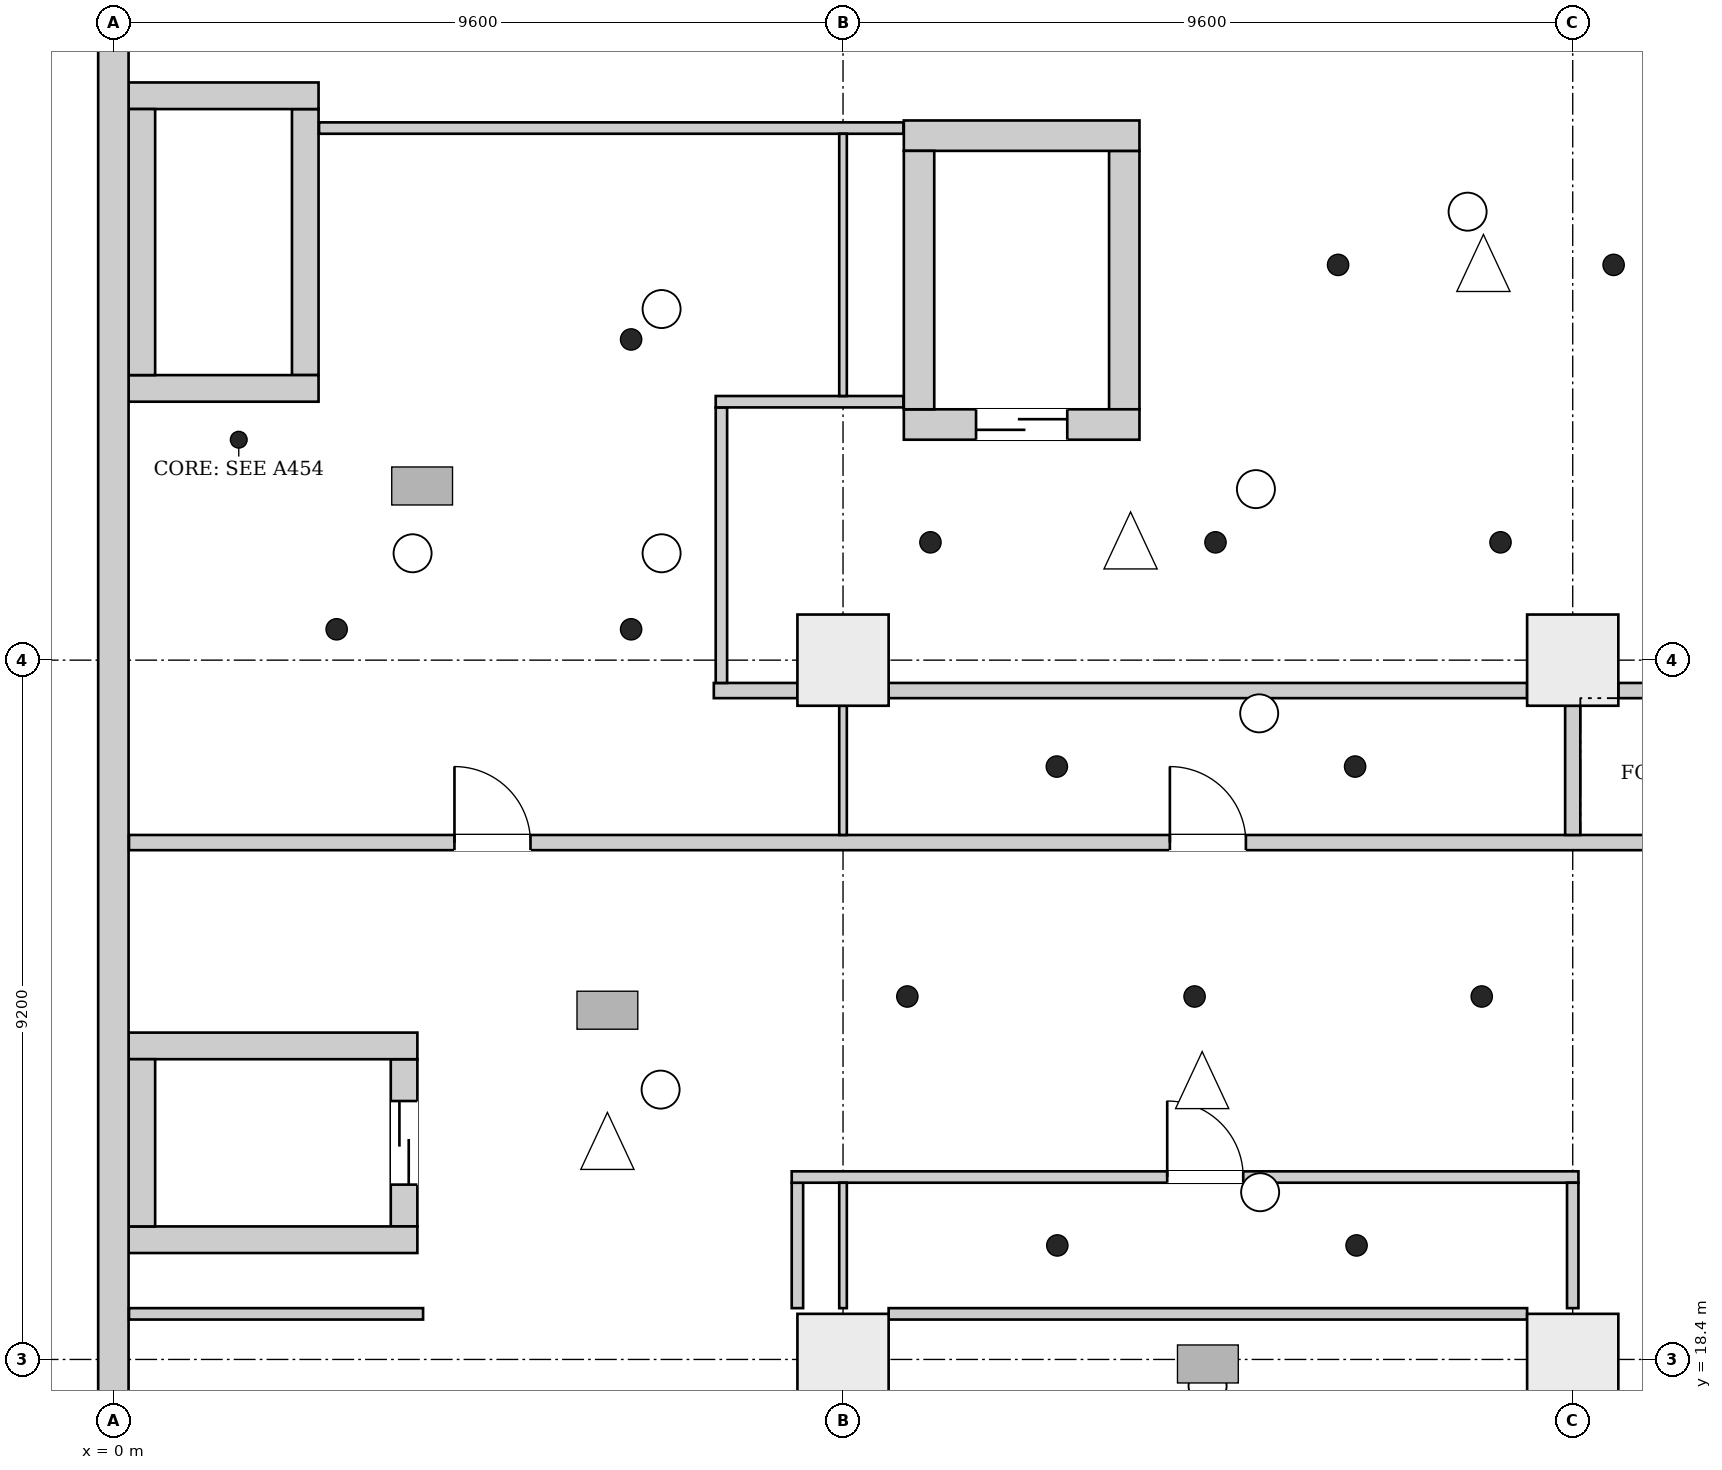
"""IFC4 building model, lengths in metres.
Left out: names, types, materials, properties, quantities, classifications, styles, units other than length and angle.
Written with IfcOpenShell. Run it as: python <this file> out.ifc"""

import sys

from ifc_helpers import new_model, si_unit, direction, frame, frame_2d, origin, origin_2d, place, context, subcontext, project, spatial, rectangle, extrude, element, fill, save


model = new_model("IFC4")
c1 = context("Model", 3, precision=1e-05, world=origin(), true_north=direction((0.0, 1.0)))
c2 = subcontext(c1, "Body", "Model", "MODEL_VIEW")
j1 = project(units=[si_unit("LENGTHUNIT", "METRE"), si_unit("PLANEANGLEUNIT", "RADIAN")], contexts=[c1])
p1 = place(None, origin())
s1 = spatial("IfcSite", under=j1, at=p1, CompositionType="ELEMENT")
p2 = place(p1, origin())
s2 = spatial("IfcBuilding", under=s1, at=p2, CompositionType="ELEMENT")
p3 = place(p2, frame((0.0, 0.0, 14.2)))
s3 = spatial("IfcBuildingStorey", under=s2, at=p3, CompositionType="ELEMENT", Elevation=14.2)
p4 = place(p3, frame((0.0, -0.2, 0.0), z_axis=(0.0, 0.0, 1.0), x_axis=(0.0, 1.0, 0.0)))
e1 = element("IfcWall", 1, at=p4, inside=s3, PredefinedType="SHEAR", context=c2, shape_type="SweptSolid", body=[
    extrude(rectangle(XDim=46.88, YDim=0.4, at=frame_2d((23.44, 0.0))), origin(), (0.0, 0.0, 1.0), 7.5),
])
for number, where, z_axis, x_axis in (
    (2, (0.2, 19.975, 0.0), (0.0, 0.0, 1.0), (1.0, 0.0, 0.0)),
    (3, (0.2, 22.525, 0.0), (0.0, 0.0, 1.0), (1.0, 0.0, 0.0)),
):
    element("IfcWall", number, at=place(p3, frame(where, z_axis=z_axis, x_axis=x_axis)), inside=s3, PredefinedType="SHEAR", context=c2, shape_type="SweptSolid", body=[
        extrude(rectangle(XDim=3.8, YDim=0.35, at=frame_2d((1.9, 0.0))), origin(), (0.0, 0.0, 1.0), 7.5),
    ])
p5 = place(p3, frame((0.375, 20.15, 0.0), z_axis=(0.0, 0.0, 1.0), x_axis=(0.0, 1.0, 0.0)))
e4 = element("IfcWall", 4, at=p5, inside=s3, PredefinedType="SHEAR", context=c2, shape_type="SweptSolid", body=[
    extrude(rectangle(XDim=2.2, YDim=0.35, at=frame_2d((1.1, 0.0))), origin(), (0.0, 0.0, 1.0), 7.5),
])
p6 = place(p3, frame((3.825, 20.15, 0.0), z_axis=(0.0, 0.0, 1.0), x_axis=(0.0, 1.0, 0.0)))
e5 = element("IfcWall", 5, at=p6, inside=s3, PredefinedType="SHEAR", context=c2, shape_type="SweptSolid", body=[
    extrude(rectangle(XDim=2.2, YDim=0.35, at=frame_2d((1.1, 0.0))), origin(), (0.0, 0.0, 1.0), 7.5),
])
p7 = place(p6, frame((0.55, 0.0, 0.0)))
e6 = element("IfcOpeningElement", 6, at=p7, cuts=e5, PredefinedType="OPENING", context=c2, shape_type="SweptSolid", body=[
    extrude(rectangle(XDim=1.1, YDim=2.1, at=frame_2d((0.55, 1.05))), frame((0.0, 0.185, 0.0), z_axis=(0.0, -1.0, 0.0), x_axis=(1.0, 0.0, 0.0)), (0.0, 0.0, 1.0), 0.37),
])
for number, where, z_axis, x_axis in (
    (7, (0.2, 31.175, 0.0), (0.0, 0.0, 1.0), (1.0, 0.0, 0.0)),
    (8, (0.2, 35.025, 0.0), (0.0, 0.0, 1.0), (1.0, 0.0, 0.0)),
):
    element("IfcWall", number, at=place(p3, frame(where, z_axis=z_axis, x_axis=x_axis)), inside=s3, PredefinedType="SHEAR", context=c2, shape_type="SweptSolid", body=[
        extrude(rectangle(XDim=2.5, YDim=0.35, at=frame_2d((1.25, 0.0))), origin(), (0.0, 0.0, 1.0), 7.5),
    ])
for number, where, z_axis, x_axis in (
    (9, (0.375, 31.35, 0.0), (0.0, 0.0, 1.0), (0.0, 1.0, 0.0)),
    (10, (2.525, 31.35, 0.0), (0.0, 0.0, 1.0), (0.0, 1.0, 0.0)),
):
    element("IfcWall", number, at=place(p3, frame(where, z_axis=z_axis, x_axis=x_axis)), inside=s3, PredefinedType="SHEAR", context=c2, shape_type="SweptSolid", body=[
        extrude(rectangle(XDim=3.5, YDim=0.35, at=frame_2d((1.75, 0.0))), origin(), (0.0, 0.0, 1.0), 7.5),
    ])
p8 = place(p3, frame((10.4, 30.7, 0.0), z_axis=(0.0, 0.0, 1.0), x_axis=(1.0, 0.0, 0.0)))
e11 = element("IfcWall", 11, at=p8, inside=s3, PredefinedType="SHEAR", context=c2, shape_type="SweptSolid", body=[
    extrude(rectangle(XDim=3.1, YDim=0.4, at=frame_2d((1.55, 0.0))), origin(), (0.0, 0.0, 1.0), 7.5),
])
p9 = place(p8, frame((0.95, 0.0, 0.0)))
e12 = element("IfcOpeningElement", 12, at=p9, cuts=e11, PredefinedType="OPENING", context=c2, shape_type="SweptSolid", body=[
    extrude(rectangle(XDim=1.2, YDim=2.1, at=frame_2d((0.6, 1.05))), frame((0.0, 0.21, 0.0), z_axis=(0.0, -1.0, 0.0), x_axis=(1.0, 0.0, 0.0)), (0.0, 0.0, 1.0), 0.42),
])
p10 = place(p3, frame((10.4, 34.5, 0.0), z_axis=(0.0, 0.0, 1.0), x_axis=(1.0, 0.0, 0.0)))
e13 = element("IfcWall", 13, at=p10, inside=s3, PredefinedType="SHEAR", context=c2, shape_type="SweptSolid", body=[
    extrude(rectangle(XDim=3.1, YDim=0.4, at=frame_2d((1.55, 0.0))), origin(), (0.0, 0.0, 1.0), 7.5),
])
for number, where, z_axis, x_axis in (
    (14, (10.6, 30.9, 0.0), (0.0, 0.0, 1.0), (0.0, 1.0, 0.0)),
    (15, (13.3, 30.9, 0.0), (0.0, 0.0, 1.0), (0.0, 1.0, 0.0)),
):
    element("IfcWall", number, at=place(p3, frame(where, z_axis=z_axis, x_axis=x_axis)), inside=s3, PredefinedType="SHEAR", context=c2, shape_type="SweptSolid", body=[
        extrude(rectangle(XDim=3.4, YDim=0.4, at=frame_2d((1.7, 0.0))), origin(), (0.0, 0.0, 1.0), 7.5),
    ])
for number, where, z_axis, x_axis in (
    (16, (9.6, 18.4, 0.0), (0.0, 0.0, 1.0), (1.0, 0.0, 0.0)),
    (17, (19.2, 18.4, 0.0), (0.0, 0.0, 1.0), (1.0, 0.0, 0.0)),
    (18, (9.6, 27.6, 0.0), (0.0, 0.0, 1.0), (1.0, 0.0, 0.0)),
    (19, (19.2, 27.6, 0.0), (0.0, 0.0, 1.0), (1.0, 0.0, 0.0)),
):
    element("IfcColumn", number, at=place(p3, frame(where, z_axis=z_axis, x_axis=x_axis)), inside=s3, PredefinedType="COLUMN", context=c2, shape_type="SweptSolid", body=[
        extrude(rectangle(XDim=1.2, YDim=1.2, at=origin_2d()), origin(), (0.0, 0.0, 1.0), 7.5),
    ])
p11 = place(p3, frame((0.206, 19.0, 0.0), z_axis=(0.0, 0.0, 1.0), x_axis=(1.0, 0.0, 0.0)))
e20 = element("IfcWall", 20, at=p11, inside=s3, PredefinedType="PARTITIONING", context=c2, shape_type="SweptSolid", body=[
    extrude(rectangle(XDim=3.869, YDim=0.15, at=frame_2d((1.935, 0.0))), origin(), (0.0, 0.0, 1.0), 7.15),
])
p12 = place(p3, frame((0.206, 25.2, 0.0), z_axis=(0.0, 0.0, 1.0), x_axis=(1.0, 0.0, 0.0)))
e21 = element("IfcWall", 21, at=p12, inside=s3, PredefinedType="PARTITIONING", context=c2, shape_type="SweptSolid", body=[
    extrude(rectangle(XDim=54.488, YDim=0.2, at=frame_2d((27.244, 0.0))), origin(), (0.0, 0.0, 1.0), 7.15),
])
p13 = place(p12, frame((4.282, 0.0, 0.0)))
e22 = element("IfcOpeningElement", 22, at=p13, cuts=e21, PredefinedType="OPENING", context=c2, shape_type="SweptSolid", body=[
    extrude(rectangle(XDim=1.0, YDim=2.1, at=frame_2d((0.5, 1.05))), frame((0.0, 0.11, 0.0), z_axis=(0.0, -1.0, 0.0), x_axis=(1.0, 0.0, 0.0)), (0.0, 0.0, 1.0), 0.22),
])
p14 = place(p12, frame((13.694, 0.0, 0.0)))
e23 = element("IfcOpeningElement", 23, at=p14, cuts=e21, PredefinedType="OPENING", context=c2, shape_type="SweptSolid", body=[
    extrude(rectangle(XDim=1.0, YDim=2.1, at=frame_2d((0.5, 1.05))), frame((0.0, 0.11, 0.0), z_axis=(0.0, -1.0, 0.0), x_axis=(1.0, 0.0, 0.0)), (0.0, 0.0, 1.0), 0.22),
])
p15 = place(p12, frame((23.294, 0.0, 0.0)))
e24 = element("IfcOpeningElement", 24, at=p15, cuts=e21, PredefinedType="OPENING", context=c2, shape_type="SweptSolid", body=[
    extrude(rectangle(XDim=1.0, YDim=2.1, at=frame_2d((0.5, 1.05))), frame((0.0, 0.11, 0.0), z_axis=(0.0, -1.0, 0.0), x_axis=(1.0, 0.0, 0.0)), (0.0, 0.0, 1.0), 0.22),
])
p16 = place(p12, frame((32.894, 0.0, 0.0)))
e25 = element("IfcOpeningElement", 25, at=p16, cuts=e21, PredefinedType="OPENING", context=c2, shape_type="SweptSolid", body=[
    extrude(rectangle(XDim=1.0, YDim=2.1, at=frame_2d((0.5, 1.05))), frame((0.0, 0.11, 0.0), z_axis=(0.0, -1.0, 0.0), x_axis=(1.0, 0.0, 0.0)), (0.0, 0.0, 1.0), 0.22),
])
p17 = place(p12, frame((42.494, 0.0, 0.0)))
e26 = element("IfcOpeningElement", 26, at=p17, cuts=e21, PredefinedType="OPENING", context=c2, shape_type="SweptSolid", body=[
    extrude(rectangle(XDim=1.0, YDim=2.1, at=frame_2d((0.5, 1.05))), frame((0.0, 0.11, 0.0), z_axis=(0.0, -1.0, 0.0), x_axis=(1.0, 0.0, 0.0)), (0.0, 0.0, 1.0), 0.22),
])
p18 = place(p12, frame((50.556, 0.0, 0.0)))
e27 = element("IfcOpeningElement", 27, at=p18, cuts=e21, PredefinedType="OPENING", context=c2, shape_type="SweptSolid", body=[
    extrude(rectangle(XDim=1.0, YDim=2.1, at=frame_2d((0.5, 1.05))), frame((0.0, 0.11, 0.0), z_axis=(0.0, -1.0, 0.0), x_axis=(1.0, 0.0, 0.0)), (0.0, 0.0, 1.0), 0.22),
])
p19 = place(p3, frame((2.706, 34.6, 0.0), z_axis=(0.0, 0.0, 1.0), x_axis=(1.0, 0.0, 0.0)))
e28 = element("IfcWall", 28, at=p19, inside=s3, PredefinedType="PARTITIONING", context=c2, shape_type="SweptSolid", body=[
    extrude(rectangle(XDim=7.688, YDim=0.15, at=frame_2d((3.844, 0.0))), origin(), (0.0, 0.0, 1.0), 7.15),
])
p20 = place(p3, frame((7.9, 27.2, 0.0), z_axis=(0.0, 0.0, 1.0), x_axis=(1.0, 0.0, 0.0)))
e29 = element("IfcWall", 29, at=p20, inside=s3, PredefinedType="PARTITIONING", context=c2, shape_type="SweptSolid", body=[
    extrude(rectangle(XDim=1.1, YDim=0.2, at=frame_2d((0.55, 0.0))), origin(), (0.0, 0.0, 1.0), 7.15),
])
p21 = place(p3, frame((8.0, 27.3, 0.0), z_axis=(0.0, 0.0, 1.0), x_axis=(0.0, 1.0, 0.0)))
e30 = element("IfcWall", 30, at=p21, inside=s3, PredefinedType="PARTITIONING", context=c2, shape_type="SweptSolid", body=[
    extrude(rectangle(XDim=3.625, YDim=0.15, at=frame_2d((1.812, 0.0))), origin(), (0.0, 0.0, 1.0), 7.15),
])
p22 = place(p3, frame((7.925, 31.0, 0.0), z_axis=(0.0, 0.0, 1.0), x_axis=(1.0, 0.0, 0.0)))
e31 = element("IfcWall", 31, at=p22, inside=s3, PredefinedType="PARTITIONING", context=c2, shape_type="SweptSolid", body=[
    extrude(rectangle(XDim=2.469, YDim=0.15, at=frame_2d((1.234, 0.0))), origin(), (0.0, 0.0, 1.0), 7.15),
])
p23 = place(p3, frame((9.0, 19.075, 0.0), z_axis=(0.0, 0.0, 1.0), x_axis=(0.0, 1.0, 0.0)))
e32 = element("IfcWall", 32, at=p23, inside=s3, PredefinedType="PARTITIONING", context=c2, shape_type="SweptSolid", body=[
    extrude(rectangle(XDim=1.65, YDim=0.15, at=frame_2d((0.825, 0.0))), origin(), (0.0, 0.0, 1.0), 7.15),
])
p24 = place(p3, frame((8.925, 20.8, 0.0), z_axis=(0.0, 0.0, 1.0), x_axis=(1.0, 0.0, 0.0)))
e33 = element("IfcWall", 33, at=p24, inside=s3, PredefinedType="PARTITIONING", context=c2, shape_type="SweptSolid", body=[
    extrude(rectangle(XDim=10.35, YDim=0.15, at=frame_2d((5.175, 0.0))), origin(), (0.0, 0.0, 1.0), 7.15),
])
p25 = place(p24, frame((4.94, 0.0, 0.0)))
e34 = element("IfcOpeningElement", 34, at=p25, cuts=e33, PredefinedType="OPENING", context=c2, shape_type="SweptSolid", body=[
    extrude(rectangle(XDim=1.0, YDim=2.1, at=frame_2d((0.5, 1.05))), frame((0.0, 0.085, 0.0), z_axis=(0.0, -1.0, 0.0), x_axis=(1.0, 0.0, 0.0)), (0.0, 0.0, 1.0), 0.17),
])
p26 = place(p3, frame((9.6, 19.075, 0.0), z_axis=(0.0, 0.0, 1.0), x_axis=(0.0, 1.0, 0.0)))
e35 = element("IfcWall", 35, at=p26, inside=s3, PredefinedType="PARTITIONING", context=c2, shape_type="SweptSolid", body=[
    extrude(rectangle(XDim=1.65, YDim=0.1, at=frame_2d((0.825, 0.0))), origin(), (0.0, 0.0, 1.0), 6.75),
])
p27 = place(p3, frame((9.6, 25.3, 0.0), z_axis=(0.0, 0.0, 1.0), x_axis=(0.0, 1.0, 0.0)))
e36 = element("IfcWall", 36, at=p27, inside=s3, PredefinedType="PARTITIONING", context=c2, shape_type="SweptSolid", body=[
    extrude(rectangle(XDim=1.7, YDim=0.1, at=frame_2d((0.85, 0.0))), origin(), (0.0, 0.0, 1.0), 6.75),
])
p28 = place(p3, frame((9.6, 31.075, 0.0), z_axis=(0.0, 0.0, 1.0), x_axis=(0.0, 1.0, 0.0)))
e37 = element("IfcWall", 37, at=p28, inside=s3, PredefinedType="PARTITIONING", context=c2, shape_type="SweptSolid", body=[
    extrude(rectangle(XDim=3.45, YDim=0.1, at=frame_2d((1.725, 0.0))), origin(), (0.0, 0.0, 1.0), 6.75),
])
p29 = place(p3, frame((10.2, 19.0, 0.0), z_axis=(0.0, 0.0, 1.0), x_axis=(1.0, 0.0, 0.0)))
e38 = element("IfcWall", 38, at=p29, inside=s3, PredefinedType="PARTITIONING", context=c2, shape_type="SweptSolid", body=[
    extrude(rectangle(XDim=8.4, YDim=0.15, at=frame_2d((4.2, 0.0))), origin(), (0.0, 0.0, 1.0), 7.15),
])
p30 = place(p3, frame((10.2, 27.2, 0.0), z_axis=(0.0, 0.0, 1.0), x_axis=(1.0, 0.0, 0.0)))
e39 = element("IfcWall", 39, at=p30, inside=s3, PredefinedType="PARTITIONING", context=c2, shape_type="SweptSolid", body=[
    extrude(rectangle(XDim=8.4, YDim=0.2, at=frame_2d((4.2, 0.0))), origin(), (0.0, 0.0, 1.0), 7.15),
])
p31 = place(p3, frame((19.2, 25.3, 0.0), z_axis=(0.0, 0.0, 1.0), x_axis=(0.0, 1.0, 0.0)))
e40 = element("IfcWall", 40, at=p31, inside=s3, PredefinedType="PARTITIONING", context=c2, shape_type="SweptSolid", body=[
    extrude(rectangle(XDim=1.7, YDim=0.2, at=frame_2d((0.85, 0.0))), origin(), (0.0, 0.0, 1.0), 6.75),
])
p32 = place(p3, frame((19.2, 19.075, 0.0), z_axis=(0.0, 0.0, 1.0), x_axis=(0.0, 1.0, 0.0)))
e41 = element("IfcWall", 41, at=p32, inside=s3, PredefinedType="PARTITIONING", context=c2, shape_type="SweptSolid", body=[
    extrude(rectangle(XDim=1.65, YDim=0.15, at=frame_2d((0.825, 0.0))), origin(), (0.0, 0.0, 1.0), 6.75),
])
p33 = place(p3, frame((19.8, 27.2, 0.0), z_axis=(0.0, 0.0, 1.0), x_axis=(1.0, 0.0, 0.0)))
e42 = element("IfcWall", 42, at=p33, inside=s3, PredefinedType="PARTITIONING", context=c2, shape_type="SweptSolid", body=[
    extrude(rectangle(XDim=8.4, YDim=0.2, at=frame_2d((4.2, 0.0))), origin(), (0.0, 0.0, 1.0), 7.15),
])
p34 = place(p7, origin())
e43 = element("IfcDoor", 43, at=p34, inside=s3, OperationType="DOUBLE_DOOR_SLIDING", PredefinedType="DOOR", context=c2, shape_type="SweptSolid", body=[
    extrude(rectangle(XDim=1.1, YDim=2.1, at=frame_2d((0.55, 1.05))), frame((0.0, 0.025, 0.0), z_axis=(0.0, -1.0, 0.0), x_axis=(1.0, 0.0, 0.0)), (0.0, 0.0, 1.0), 0.05),
])
fill(e6, e43)
p35 = place(p9, origin())
e44 = element("IfcDoor", 44, at=p35, inside=s3, OperationType="DOUBLE_DOOR_SLIDING", PredefinedType="DOOR", context=c2, shape_type="SweptSolid", body=[
    extrude(rectangle(XDim=1.2, YDim=2.1, at=frame_2d((0.6, 1.05))), frame((0.0, 0.025, 0.0), z_axis=(0.0, -1.0, 0.0), x_axis=(1.0, 0.0, 0.0)), (0.0, 0.0, 1.0), 0.05),
])
fill(e12, e44)
p36 = place(p25, origin())
e45 = element("IfcDoor", 45, at=p36, inside=s3, OperationType="SINGLE_SWING_LEFT", PredefinedType="DOOR", context=c2, shape_type="SweptSolid", body=[
    extrude(rectangle(XDim=1.0, YDim=2.1, at=frame_2d((0.5, 1.05))), frame((0.0, 0.025, 0.0), z_axis=(0.0, -1.0, 0.0), x_axis=(1.0, 0.0, 0.0)), (0.0, 0.0, 1.0), 0.05),
])
fill(e34, e45)
p37 = place(p13, origin())
e46 = element("IfcDoor", 46, at=p37, inside=s3, OperationType="SINGLE_SWING_LEFT", PredefinedType="DOOR", context=c2, shape_type="SweptSolid", body=[
    extrude(rectangle(XDim=1.0, YDim=2.1, at=frame_2d((0.5, 1.05))), frame((0.0, 0.025, 0.0), z_axis=(0.0, -1.0, 0.0), x_axis=(1.0, 0.0, 0.0)), (0.0, 0.0, 1.0), 0.05),
])
fill(e22, e46)
p38 = place(p14, origin())
e47 = element("IfcDoor", 47, at=p38, inside=s3, OperationType="SINGLE_SWING_LEFT", PredefinedType="DOOR", context=c2, shape_type="SweptSolid", body=[
    extrude(rectangle(XDim=1.0, YDim=2.1, at=frame_2d((0.5, 1.05))), frame((0.0, 0.025, 0.0), z_axis=(0.0, -1.0, 0.0), x_axis=(1.0, 0.0, 0.0)), (0.0, 0.0, 1.0), 0.05),
])
fill(e23, e47)
save(model, sys.argv[1])
